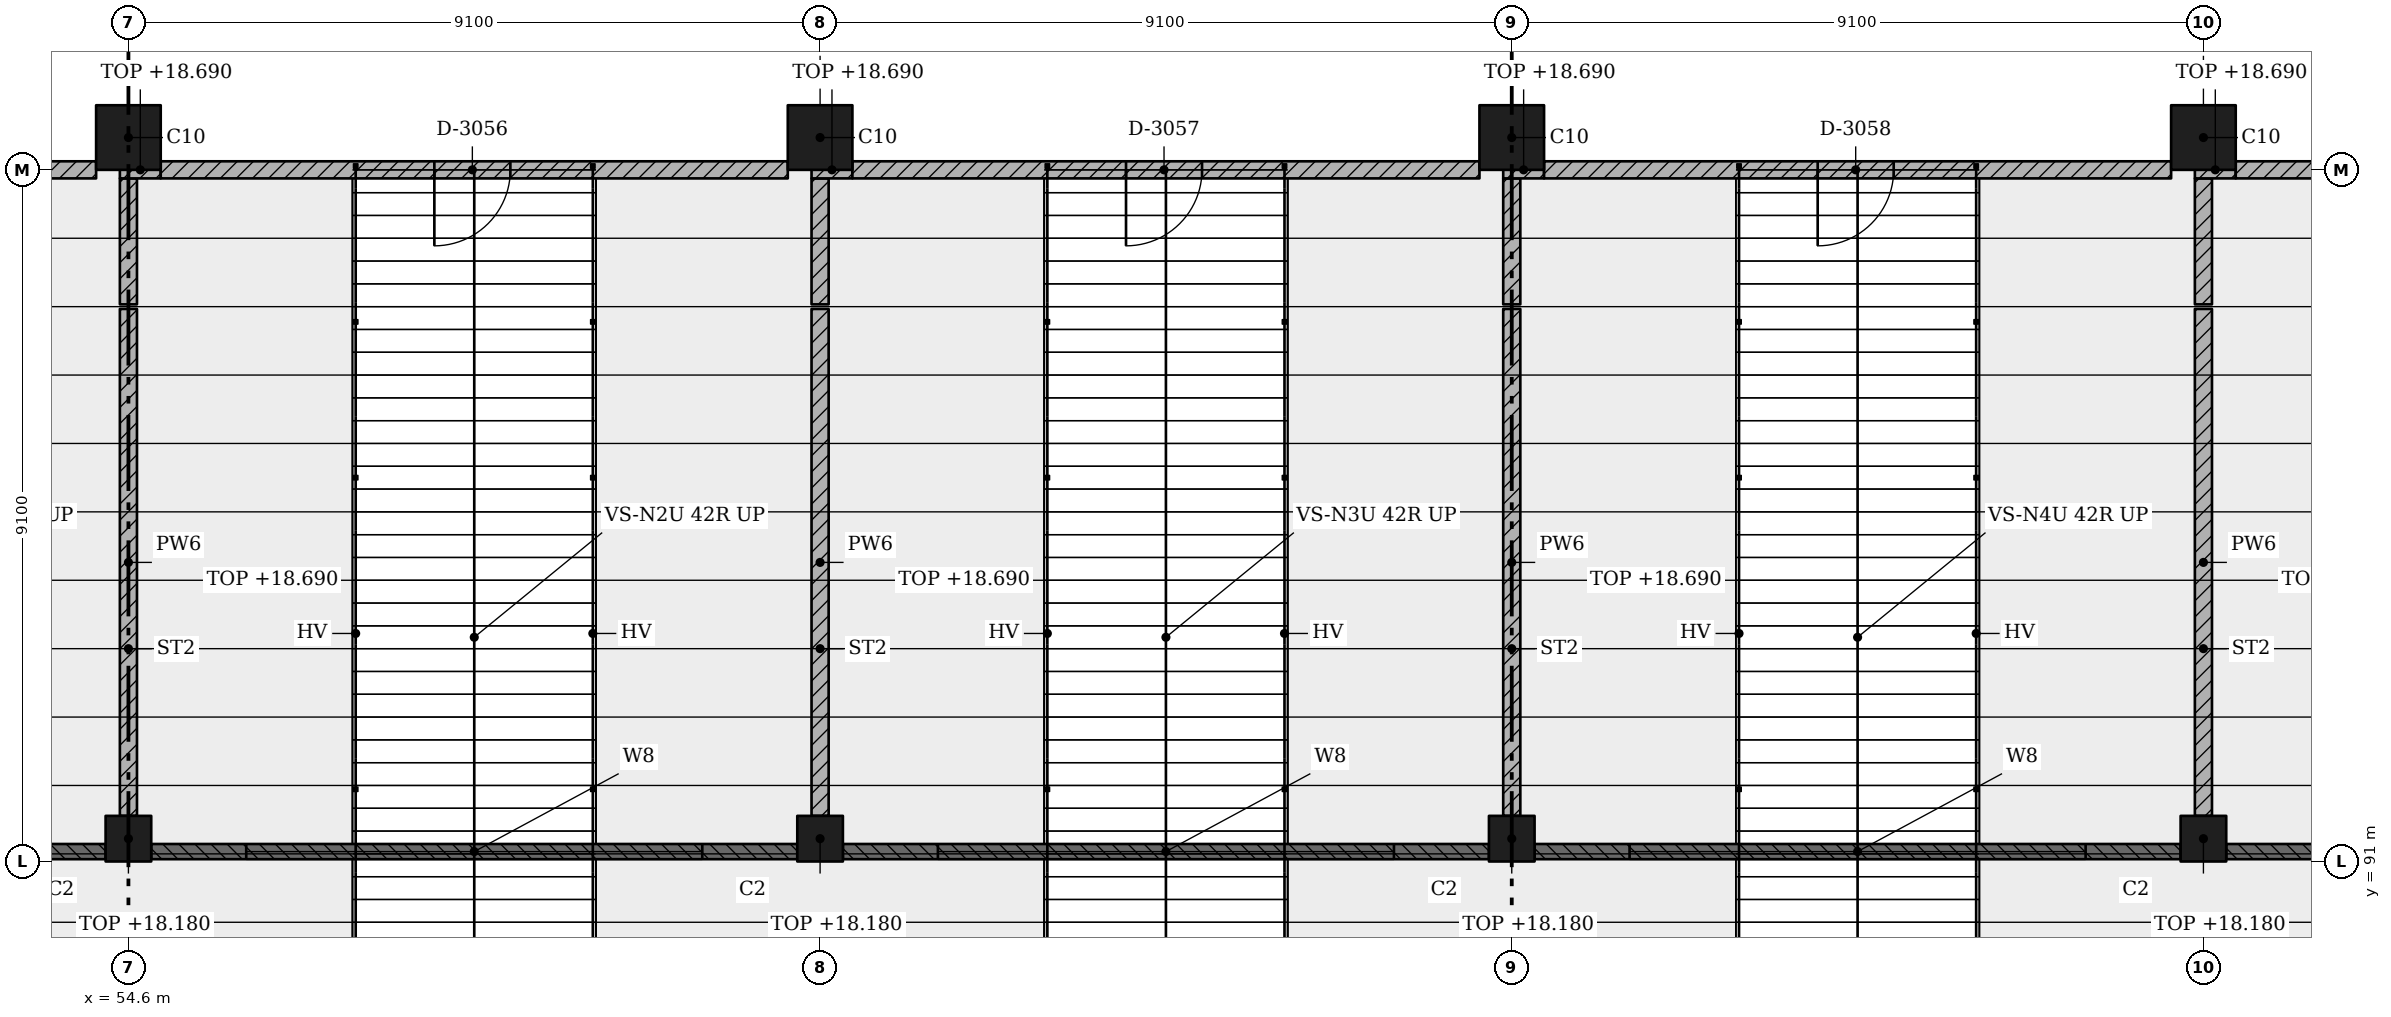
"""IFC4 building model, lengths in metres.
Left out: names, types, materials, properties, quantities, classifications, styles, units other than length and angle.
Written with IfcOpenShell. Run it as: python <this file> out.ifc"""

import sys

from ifc_helpers import new_model, si_unit, direction, frame, frame_2d, origin, origin_2d, place, context, subcontext, project, spatial, rectangle, extrude, element, fill, save


model = new_model("IFC4")
c1 = context("Model", 3, precision=1e-05, world=origin(), true_north=direction((0.0, 1.0)))
c2 = subcontext(c1, "Body", "Model", "MODEL_VIEW")
j1 = project(units=[si_unit("LENGTHUNIT", "METRE"), si_unit("PLANEANGLEUNIT", "RADIAN")], contexts=[c1])
p1 = place(None, origin())
s1 = spatial("IfcSite", under=j1, at=p1, CompositionType="ELEMENT")
p2 = place(p1, origin())
s2 = spatial("IfcBuilding", under=s1, at=p2, CompositionType="ELEMENT")
p3 = place(p2, frame((0.0, 0.0, 15.47)))
s3 = spatial("IfcBuildingStorey", under=s2, at=p3, CompositionType="ELEMENT", Elevation=15.47)
p4 = place(p3, frame((54.6, 91.3, 0.0), z_axis=(0.0, 0.0, 1.0), x_axis=(1.0, 0.0, 0.0)))
e1 = element("IfcColumn", 1, at=p4, inside=s3, PredefinedType="COLUMN", context=c2, shape_type="SweptSolid", body=[
    extrude(rectangle(XDim=0.6, YDim=0.6, at=origin_2d()), origin(), (0.0, 0.0, 1.0), 2.71),
])
p5 = place(p3, frame((54.6, 100.525, 0.0), z_axis=(0.0, 0.0, 1.0), x_axis=(1.0, 0.0, 0.0)))
e2 = element("IfcColumn", 2, at=p5, inside=s3, PredefinedType="COLUMN", context=c2, shape_type="SweptSolid", body=[
    extrude(rectangle(XDim=0.85, YDim=0.85, at=origin_2d()), origin(), (0.0, 0.0, 1.0), 4.55),
])
p6 = place(p3, frame((63.7, 91.3, 0.0), z_axis=(0.0, 0.0, 1.0), x_axis=(1.0, 0.0, 0.0)))
e3 = element("IfcColumn", 3, at=p6, inside=s3, PredefinedType="COLUMN", context=c2, shape_type="SweptSolid", body=[
    extrude(rectangle(XDim=0.6, YDim=0.6, at=origin_2d()), origin(), (0.0, 0.0, 1.0), 2.71),
])
p7 = place(p3, frame((63.7, 100.525, 0.0), z_axis=(0.0, 0.0, 1.0), x_axis=(1.0, 0.0, 0.0)))
e4 = element("IfcColumn", 4, at=p7, inside=s3, PredefinedType="COLUMN", context=c2, shape_type="SweptSolid", body=[
    extrude(rectangle(XDim=0.85, YDim=0.85, at=origin_2d()), origin(), (0.0, 0.0, 1.0), 4.55),
])
p8 = place(p3, frame((72.8, 91.3, 0.0), z_axis=(0.0, 0.0, 1.0), x_axis=(1.0, 0.0, 0.0)))
e5 = element("IfcColumn", 5, at=p8, inside=s3, PredefinedType="COLUMN", context=c2, shape_type="SweptSolid", body=[
    extrude(rectangle(XDim=0.6, YDim=0.6, at=origin_2d()), origin(), (0.0, 0.0, 1.0), 2.71),
])
p9 = place(p3, frame((72.8, 100.525, 0.0), z_axis=(0.0, 0.0, 1.0), x_axis=(1.0, 0.0, 0.0)))
e6 = element("IfcColumn", 6, at=p9, inside=s3, PredefinedType="COLUMN", context=c2, shape_type="SweptSolid", body=[
    extrude(rectangle(XDim=0.85, YDim=0.85, at=origin_2d()), origin(), (0.0, 0.0, 1.0), 4.55),
])
p10 = place(p3, frame((81.9, 91.3, 0.0), z_axis=(0.0, 0.0, 1.0), x_axis=(1.0, 0.0, 0.0)))
e7 = element("IfcColumn", 7, at=p10, inside=s3, PredefinedType="COLUMN", context=c2, shape_type="SweptSolid", body=[
    extrude(rectangle(XDim=0.6, YDim=0.6, at=origin_2d()), origin(), (0.0, 0.0, 1.0), 2.71),
])
p11 = place(p3, frame((81.9, 100.525, 0.0), z_axis=(0.0, 0.0, 1.0), x_axis=(1.0, 0.0, 0.0)))
e8 = element("IfcColumn", 8, at=p11, inside=s3, PredefinedType="COLUMN", context=c2, shape_type="SweptSolid", body=[
    extrude(rectangle(XDim=0.85, YDim=0.85, at=origin_2d()), origin(), (0.0, 0.0, 1.0), 4.55),
])
p12 = place(p3, frame((54.175, 100.1, 0.0), z_axis=(0.0, 0.0, 1.0), x_axis=(-1.0, 0.0, 0.0)))
e9 = element("IfcWall", 9, at=p12, inside=s3, PredefinedType="PARTITIONING", context=c2, shape_type="SweptSolid", body=[
    extrude(rectangle(XDim=8.25, YDim=0.225, at=frame_2d((4.125, 0.0))), origin(), (0.0, 0.0, 1.0), 3.6),
])
p13 = place(p12, frame((3.65, 0.0, 0.0)))
e10 = element("IfcOpeningElement", 10, at=p13, cuts=e9, PredefinedType="OPENING", context=c2, shape_type="SweptSolid", body=[
    extrude(rectangle(XDim=1.0, YDim=2.4, at=frame_2d((0.5, 1.2))), frame((0.0, 0.123, 0.0), z_axis=(0.0, -1.0, 0.0), x_axis=(1.0, 0.0, 0.0)), (0.0, 0.0, 1.0), 0.245),
])
p14 = place(p3, frame((54.6, 98.27, 0.0), z_axis=(0.0, 0.0, 1.0), x_axis=(0.0, -1.0, 0.0)))
e11 = element("IfcWall", 11, at=p14, inside=s3, PredefinedType="PARTITIONING", context=c2, shape_type="SweptSolid", body=[
    extrude(rectangle(XDim=6.67, YDim=0.225, at=frame_2d((3.335, 0.0))), origin(), (0.0, 0.0, 1.0), 3.22),
])
p15 = place(p3, frame((54.6, 99.988, 0.0), z_axis=(0.0, 0.0, 1.0), x_axis=(0.0, -1.0, 0.0)))
e12 = element("IfcWall", 12, at=p15, inside=s3, PredefinedType="PARTITIONING", context=c2, shape_type="SweptSolid", body=[
    extrude(rectangle(XDim=1.657, YDim=0.225, at=frame_2d((0.829, 0.0))), origin(), (0.0, 0.0, 1.0), 3.22),
])
p16 = place(p3, frame((55.025, 100.1, 0.0), z_axis=(0.0, 0.0, 1.0), x_axis=(-1.0, 0.0, 0.0)))
e13 = element("IfcWall", 13, at=p16, inside=s3, PredefinedType="PARTITIONING", context=c2, shape_type="SweptSolid", body=[
    extrude(rectangle(XDim=0.537, YDim=0.225, at=frame_2d((0.269, 0.0))), origin(), (0.0, 0.0, 1.0), 3.22),
])
p17 = place(p3, frame((63.275, 100.1, 0.0), z_axis=(0.0, 0.0, 1.0), x_axis=(-1.0, 0.0, 0.0)))
e14 = element("IfcWall", 14, at=p17, inside=s3, PredefinedType="PARTITIONING", context=c2, shape_type="SweptSolid", body=[
    extrude(rectangle(XDim=8.25, YDim=0.225, at=frame_2d((4.125, 0.0))), origin(), (0.0, 0.0, 1.0), 3.6),
])
p18 = place(p17, frame((3.65, 0.0, 0.0)))
e15 = element("IfcOpeningElement", 15, at=p18, cuts=e14, PredefinedType="OPENING", context=c2, shape_type="SweptSolid", body=[
    extrude(rectangle(XDim=1.0, YDim=2.4, at=frame_2d((0.5, 1.2))), frame((0.0, 0.123, 0.0), z_axis=(0.0, -1.0, 0.0), x_axis=(1.0, 0.0, 0.0)), (0.0, 0.0, 1.0), 0.245),
])
p19 = place(p3, frame((63.7, 98.27, 0.0), z_axis=(0.0, 0.0, 1.0), x_axis=(0.0, -1.0, 0.0)))
e16 = element("IfcWall", 16, at=p19, inside=s3, PredefinedType="PARTITIONING", context=c2, shape_type="SweptSolid", body=[
    extrude(rectangle(XDim=6.67, YDim=0.225, at=frame_2d((3.335, 0.0))), origin(), (0.0, 0.0, 1.0), 3.22),
])
p20 = place(p3, frame((63.7, 99.988, 0.0), z_axis=(0.0, 0.0, 1.0), x_axis=(0.0, -1.0, 0.0)))
e17 = element("IfcWall", 17, at=p20, inside=s3, PredefinedType="PARTITIONING", context=c2, shape_type="SweptSolid", body=[
    extrude(rectangle(XDim=1.657, YDim=0.225, at=frame_2d((0.829, 0.0))), origin(), (0.0, 0.0, 1.0), 3.22),
])
p21 = place(p3, frame((64.125, 100.1, 0.0), z_axis=(0.0, 0.0, 1.0), x_axis=(-1.0, 0.0, 0.0)))
e18 = element("IfcWall", 18, at=p21, inside=s3, PredefinedType="PARTITIONING", context=c2, shape_type="SweptSolid", body=[
    extrude(rectangle(XDim=0.538, YDim=0.225, at=frame_2d((0.269, 0.0))), origin(), (0.0, 0.0, 1.0), 3.22),
])
p22 = place(p3, frame((72.375, 100.1, 0.0), z_axis=(0.0, 0.0, 1.0), x_axis=(-1.0, 0.0, 0.0)))
e19 = element("IfcWall", 19, at=p22, inside=s3, PredefinedType="PARTITIONING", context=c2, shape_type="SweptSolid", body=[
    extrude(rectangle(XDim=8.25, YDim=0.225, at=frame_2d((4.125, 0.0))), origin(), (0.0, 0.0, 1.0), 3.6),
])
p23 = place(p22, frame((3.65, 0.0, 0.0)))
e20 = element("IfcOpeningElement", 20, at=p23, cuts=e19, PredefinedType="OPENING", context=c2, shape_type="SweptSolid", body=[
    extrude(rectangle(XDim=1.0, YDim=2.4, at=frame_2d((0.5, 1.2))), frame((0.0, 0.123, 0.0), z_axis=(0.0, -1.0, 0.0), x_axis=(1.0, 0.0, 0.0)), (0.0, 0.0, 1.0), 0.245),
])
p24 = place(p3, frame((72.8, 98.27, 0.0), z_axis=(0.0, 0.0, 1.0), x_axis=(0.0, -1.0, 0.0)))
e21 = element("IfcWall", 21, at=p24, inside=s3, PredefinedType="PARTITIONING", context=c2, shape_type="SweptSolid", body=[
    extrude(rectangle(XDim=6.67, YDim=0.225, at=frame_2d((3.335, 0.0))), origin(), (0.0, 0.0, 1.0), 3.22),
])
p25 = place(p3, frame((72.8, 99.988, 0.0), z_axis=(0.0, 0.0, 1.0), x_axis=(0.0, -1.0, 0.0)))
e22 = element("IfcWall", 22, at=p25, inside=s3, PredefinedType="PARTITIONING", context=c2, shape_type="SweptSolid", body=[
    extrude(rectangle(XDim=1.657, YDim=0.225, at=frame_2d((0.829, 0.0))), origin(), (0.0, 0.0, 1.0), 3.22),
])
p26 = place(p3, frame((73.225, 100.1, 0.0), z_axis=(0.0, 0.0, 1.0), x_axis=(-1.0, 0.0, 0.0)))
e23 = element("IfcWall", 23, at=p26, inside=s3, PredefinedType="PARTITIONING", context=c2, shape_type="SweptSolid", body=[
    extrude(rectangle(XDim=0.538, YDim=0.225, at=frame_2d((0.269, 0.0))), origin(), (0.0, 0.0, 1.0), 3.22),
])
p27 = place(p3, frame((81.475, 100.1, 0.0), z_axis=(0.0, 0.0, 1.0), x_axis=(-1.0, 0.0, 0.0)))
e24 = element("IfcWall", 24, at=p27, inside=s3, PredefinedType="PARTITIONING", context=c2, shape_type="SweptSolid", body=[
    extrude(rectangle(XDim=8.25, YDim=0.225, at=frame_2d((4.125, 0.0))), origin(), (0.0, 0.0, 1.0), 3.6),
])
p28 = place(p27, frame((3.65, 0.0, 0.0)))
e25 = element("IfcOpeningElement", 25, at=p28, cuts=e24, PredefinedType="OPENING", context=c2, shape_type="SweptSolid", body=[
    extrude(rectangle(XDim=1.0, YDim=2.4, at=frame_2d((0.5, 1.2))), frame((0.0, 0.123, 0.0), z_axis=(0.0, -1.0, 0.0), x_axis=(1.0, 0.0, 0.0)), (0.0, 0.0, 1.0), 0.245),
])
p29 = place(p3, frame((81.9, 98.27, 0.0), z_axis=(0.0, 0.0, 1.0), x_axis=(0.0, -1.0, 0.0)))
e26 = element("IfcWall", 26, at=p29, inside=s3, PredefinedType="PARTITIONING", context=c2, shape_type="SweptSolid", body=[
    extrude(rectangle(XDim=6.67, YDim=0.225, at=frame_2d((3.335, 0.0))), origin(), (0.0, 0.0, 1.0), 3.22),
])
p30 = place(p3, frame((81.9, 99.988, 0.0), z_axis=(0.0, 0.0, 1.0), x_axis=(0.0, -1.0, 0.0)))
e27 = element("IfcWall", 27, at=p30, inside=s3, PredefinedType="PARTITIONING", context=c2, shape_type="SweptSolid", body=[
    extrude(rectangle(XDim=1.657, YDim=0.225, at=frame_2d((0.829, 0.0))), origin(), (0.0, 0.0, 1.0), 3.22),
])
p31 = place(p3, frame((82.325, 100.1, 0.0), z_axis=(0.0, 0.0, 1.0), x_axis=(-1.0, 0.0, 0.0)))
e28 = element("IfcWall", 28, at=p31, inside=s3, PredefinedType="PARTITIONING", context=c2, shape_type="SweptSolid", body=[
    extrude(rectangle(XDim=0.537, YDim=0.225, at=frame_2d((0.269, 0.0))), origin(), (0.0, 0.0, 1.0), 3.22),
])
p32 = place(p3, frame((90.575, 100.1, 0.0), z_axis=(0.0, 0.0, 1.0), x_axis=(-1.0, 0.0, 0.0)))
e29 = element("IfcWall", 29, at=p32, inside=s3, PredefinedType="PARTITIONING", context=c2, shape_type="SweptSolid", body=[
    extrude(rectangle(XDim=8.25, YDim=0.225, at=frame_2d((4.125, 0.0))), origin(), (0.0, 0.0, 1.0), 3.6),
])
p33 = place(p32, frame((3.65, 0.0, 0.0)))
e30 = element("IfcOpeningElement", 30, at=p33, cuts=e29, PredefinedType="OPENING", context=c2, shape_type="SweptSolid", body=[
    extrude(rectangle(XDim=1.0, YDim=2.4, at=frame_2d((0.5, 1.2))), frame((0.0, 0.123, 0.0), z_axis=(0.0, -1.0, 0.0), x_axis=(1.0, 0.0, 0.0)), (0.0, 0.0, 1.0), 0.245),
])
p34 = place(p3, frame((54.3, 91.13, 0.0), z_axis=(0.0, 0.0, 1.0), x_axis=(-1.0, 0.0, 0.0)))
e31 = element("IfcWall", 31, at=p34, inside=s3, PredefinedType="PARTITIONING", context=c2, shape_type="SweptSolid", body=[
    extrude(rectangle(XDim=8.5, YDim=0.2, at=frame_2d((4.25, 0.0))), origin(), (0.0, 0.0, 1.0), 2.71),
])
p35 = place(p34, frame((1.25, 0.0, 1.1)))
e32 = element("IfcOpeningElement", 32, at=p35, cuts=e31, PredefinedType="OPENING", context=c2, shape_type="SweptSolid", body=[
    extrude(rectangle(XDim=6.0, YDim=1.3, at=frame_2d((3.0, 0.65))), frame((0.0, 0.11, 0.0), z_axis=(0.0, -1.0, 0.0), x_axis=(1.0, 0.0, 0.0)), (0.0, 0.0, 1.0), 0.22),
])
p36 = place(p3, frame((63.4, 91.13, 0.0), z_axis=(0.0, 0.0, 1.0), x_axis=(-1.0, 0.0, 0.0)))
e33 = element("IfcWall", 33, at=p36, inside=s3, PredefinedType="PARTITIONING", context=c2, shape_type="SweptSolid", body=[
    extrude(rectangle(XDim=8.5, YDim=0.2, at=frame_2d((4.25, 0.0))), origin(), (0.0, 0.0, 1.0), 2.71),
])
p37 = place(p36, frame((1.25, 0.0, 1.1)))
e34 = element("IfcOpeningElement", 34, at=p37, cuts=e33, PredefinedType="OPENING", context=c2, shape_type="SweptSolid", body=[
    extrude(rectangle(XDim=6.0, YDim=1.3, at=frame_2d((3.0, 0.65))), frame((0.0, 0.11, 0.0), z_axis=(0.0, -1.0, 0.0), x_axis=(1.0, 0.0, 0.0)), (0.0, 0.0, 1.0), 0.22),
])
p38 = place(p3, frame((72.5, 91.13, 0.0), z_axis=(0.0, 0.0, 1.0), x_axis=(-1.0, 0.0, 0.0)))
e35 = element("IfcWall", 35, at=p38, inside=s3, PredefinedType="PARTITIONING", context=c2, shape_type="SweptSolid", body=[
    extrude(rectangle(XDim=8.5, YDim=0.2, at=frame_2d((4.25, 0.0))), origin(), (0.0, 0.0, 1.0), 2.71),
])
p39 = place(p38, frame((1.25, 0.0, 1.1)))
e36 = element("IfcOpeningElement", 36, at=p39, cuts=e35, PredefinedType="OPENING", context=c2, shape_type="SweptSolid", body=[
    extrude(rectangle(XDim=6.0, YDim=1.3, at=frame_2d((3.0, 0.65))), frame((0.0, 0.11, 0.0), z_axis=(0.0, -1.0, 0.0), x_axis=(1.0, 0.0, 0.0)), (0.0, 0.0, 1.0), 0.22),
])
p40 = place(p3, frame((81.6, 91.13, 0.0), z_axis=(0.0, 0.0, 1.0), x_axis=(-1.0, 0.0, 0.0)))
e37 = element("IfcWall", 37, at=p40, inside=s3, PredefinedType="PARTITIONING", context=c2, shape_type="SweptSolid", body=[
    extrude(rectangle(XDim=8.5, YDim=0.2, at=frame_2d((4.25, 0.0))), origin(), (0.0, 0.0, 1.0), 2.71),
])
p41 = place(p40, frame((1.25, 0.0, 1.1)))
e38 = element("IfcOpeningElement", 38, at=p41, cuts=e37, PredefinedType="OPENING", context=c2, shape_type="SweptSolid", body=[
    extrude(rectangle(XDim=6.0, YDim=1.3, at=frame_2d((3.0, 0.65))), frame((0.0, 0.11, 0.0), z_axis=(0.0, -1.0, 0.0), x_axis=(1.0, 0.0, 0.0)), (0.0, 0.0, 1.0), 0.22),
])
p42 = place(p3, frame((90.7, 91.13, 0.0), z_axis=(0.0, 0.0, 1.0), x_axis=(-1.0, 0.0, 0.0)))
e39 = element("IfcWall", 39, at=p42, inside=s3, PredefinedType="PARTITIONING", context=c2, shape_type="SweptSolid", body=[
    extrude(rectangle(XDim=8.5, YDim=0.2, at=frame_2d((4.25, 0.0))), origin(), (0.0, 0.0, 1.0), 2.71),
])
p43 = place(p42, frame((1.25, 0.0, 1.1)))
e40 = element("IfcOpeningElement", 40, at=p43, cuts=e39, PredefinedType="OPENING", context=c2, shape_type="SweptSolid", body=[
    extrude(rectangle(XDim=6.0, YDim=1.3, at=frame_2d((3.0, 0.65))), frame((0.0, 0.11, 0.0), z_axis=(0.0, -1.0, 0.0), x_axis=(1.0, 0.0, 0.0)), (0.0, 0.0, 1.0), 0.22),
])
p44 = place(p37, origin())
e41 = element("IfcWindow", 41, at=p44, inside=s3, PartitioningType="SINGLE_PANEL", PredefinedType="WINDOW", context=c2, shape_type="SweptSolid", body=[
    extrude(rectangle(XDim=6.0, YDim=1.3, at=frame_2d((3.0, 0.65))), frame((0.0, 0.03, 0.0), z_axis=(0.0, -1.0, 0.0), x_axis=(1.0, 0.0, 0.0)), (0.0, 0.0, 1.0), 0.06),
])
fill(e34, e41)
p45 = place(p39, origin())
e42 = element("IfcWindow", 42, at=p45, inside=s3, PartitioningType="SINGLE_PANEL", PredefinedType="WINDOW", context=c2, shape_type="SweptSolid", body=[
    extrude(rectangle(XDim=6.0, YDim=1.3, at=frame_2d((3.0, 0.65))), frame((0.0, 0.03, 0.0), z_axis=(0.0, -1.0, 0.0), x_axis=(1.0, 0.0, 0.0)), (0.0, 0.0, 1.0), 0.06),
])
fill(e36, e42)
p46 = place(p41, origin())
e43 = element("IfcWindow", 43, at=p46, inside=s3, PartitioningType="SINGLE_PANEL", PredefinedType="WINDOW", context=c2, shape_type="SweptSolid", body=[
    extrude(rectangle(XDim=6.0, YDim=1.3, at=frame_2d((3.0, 0.65))), frame((0.0, 0.03, 0.0), z_axis=(0.0, -1.0, 0.0), x_axis=(1.0, 0.0, 0.0)), (0.0, 0.0, 1.0), 0.06),
])
fill(e38, e43)
p47 = place(p18, origin())
e44 = element("IfcDoor", 44, at=p47, inside=s3, OperationType="SINGLE_SWING_LEFT", PredefinedType="DOOR", context=c2, shape_type="SweptSolid", body=[
    extrude(rectangle(XDim=1.0, YDim=2.4, at=frame_2d((0.5, 1.2))), frame((0.0, 0.025, 0.0), z_axis=(0.0, -1.0, 0.0), x_axis=(1.0, 0.0, 0.0)), (0.0, 0.0, 1.0), 0.05),
])
fill(e15, e44)
p48 = place(p23, origin())
e45 = element("IfcDoor", 45, at=p48, inside=s3, OperationType="SINGLE_SWING_LEFT", PredefinedType="DOOR", context=c2, shape_type="SweptSolid", body=[
    extrude(rectangle(XDim=1.0, YDim=2.4, at=frame_2d((0.5, 1.2))), frame((0.0, 0.025, 0.0), z_axis=(0.0, -1.0, 0.0), x_axis=(1.0, 0.0, 0.0)), (0.0, 0.0, 1.0), 0.05),
])
fill(e20, e45)
p49 = place(p28, origin())
e46 = element("IfcDoor", 46, at=p49, inside=s3, OperationType="SINGLE_SWING_LEFT", PredefinedType="DOOR", context=c2, shape_type="SweptSolid", body=[
    extrude(rectangle(XDim=1.0, YDim=2.4, at=frame_2d((0.5, 1.2))), frame((0.0, 0.025, 0.0), z_axis=(0.0, -1.0, 0.0), x_axis=(1.0, 0.0, 0.0)), (0.0, 0.0, 1.0), 0.05),
])
fill(e25, e46)
save(model, sys.argv[1])
